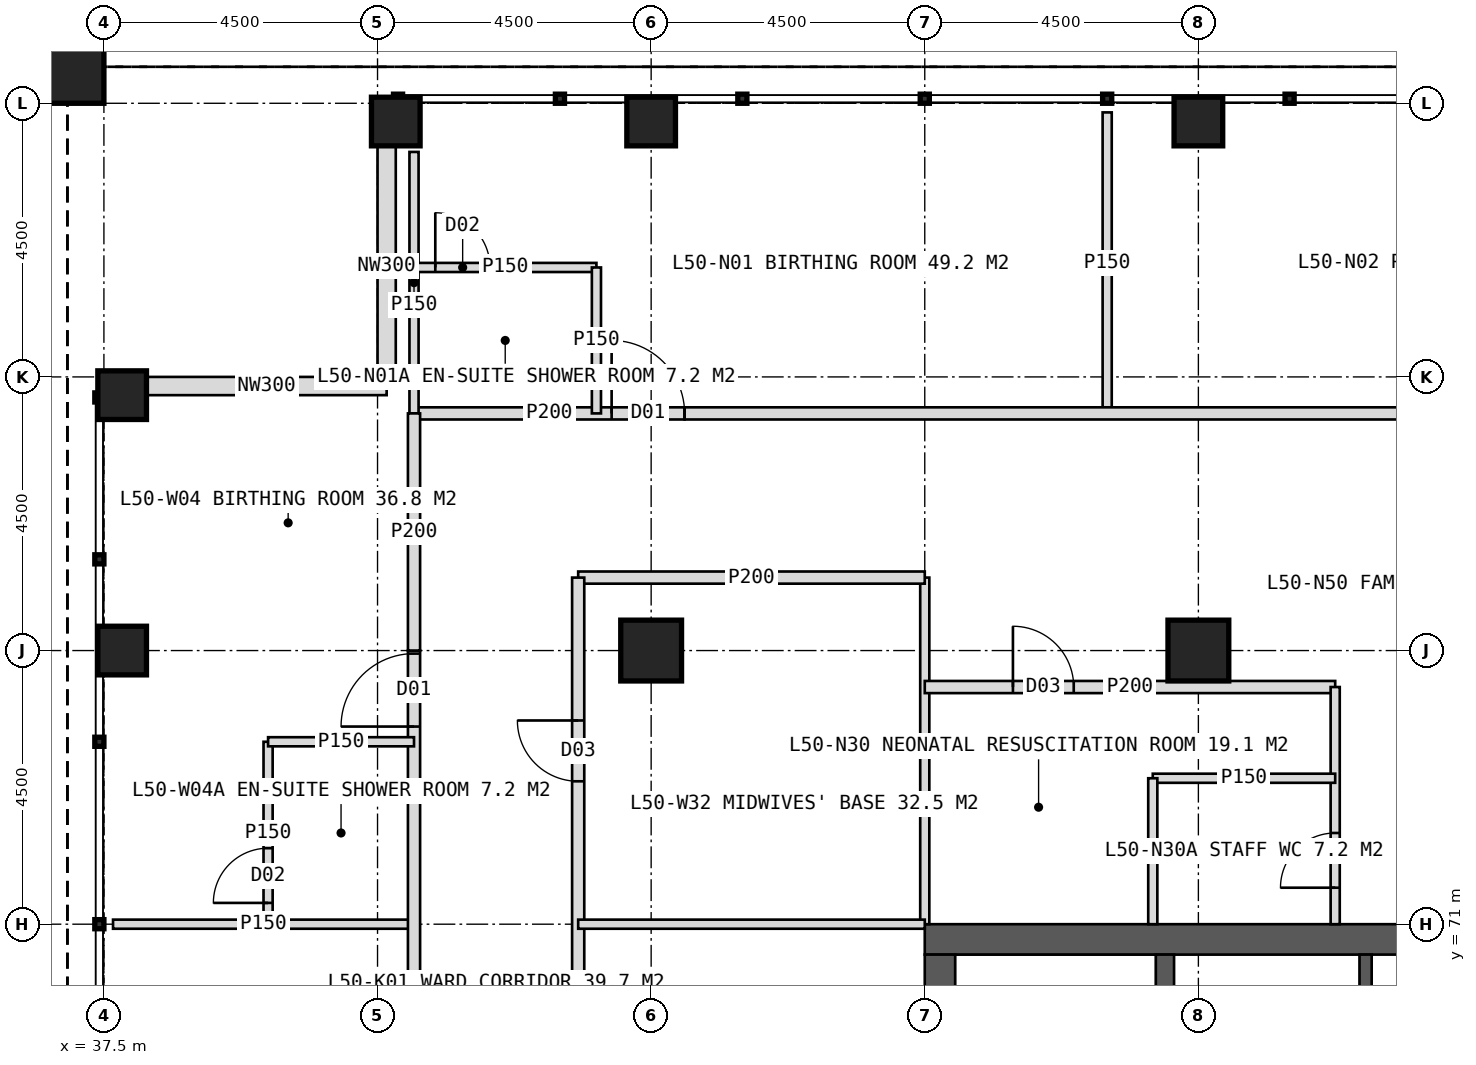
"""IFC4 building model, lengths in metres.
Left out: names, types, materials, properties, quantities, classifications, styles, units other than length and angle.
Written with IfcOpenShell. Run it as: python <this file> out.ifc"""

import sys

from ifc_helpers import new_model, si_unit, direction, frame, frame_2d, origin, origin_2d, place, context, subcontext, project, spatial, rectangle, hollow_rectangle, extrude, element, fill, save


model = new_model("IFC4")
c1 = context("Model", 3, precision=1e-05, world=origin(), true_north=direction((0.0, 1.0)))
c2 = subcontext(c1, "Body", "Model", "MODEL_VIEW")
j1 = project(units=[si_unit("LENGTHUNIT", "METRE"), si_unit("PLANEANGLEUNIT", "RADIAN")], contexts=[c1])
p1 = place(None, origin())
s1 = spatial("IfcSite", under=j1, at=p1, CompositionType="ELEMENT")
p2 = place(p1, origin())
s2 = spatial("IfcBuilding", under=s1, at=p2, CompositionType="ELEMENT")
p3 = place(p2, frame((0.0, 0.0, 209.0)))
s3 = spatial("IfcBuildingStorey", under=s2, at=p3, CompositionType="ELEMENT", Elevation=209.0)
p4 = place(p3, frame((51.0, 70.75, 0.0), z_axis=(0.0, 0.0, 1.0), x_axis=(1.0, 0.0, 0.0)))
e1 = element("IfcWall", 1, at=p4, inside=s3, PredefinedType="SHEAR", context=c2, shape_type="SweptSolid", body=[
    extrude(rectangle(XDim=18.0, YDim=0.5, at=frame_2d((9.0, 0.0))), origin(), (0.0, 0.0, 1.0), 4.0),
])
p5 = place(p4, frame((8.1, 0.0, 0.0)))
e2 = element("IfcOpeningElement", 2, at=p5, cuts=e1, PredefinedType="OPENING", context=c2, shape_type="SweptSolid", body=[
    extrude(rectangle(XDim=1.8, YDim=2.2, at=frame_2d((0.9, 1.1))), frame((0.0, 0.26, 0.0), z_axis=(0.0, -1.0, 0.0), x_axis=(1.0, 0.0, 0.0)), (0.0, 0.0, 1.0), 0.52),
])
p6 = place(p3, frame((51.25, 53.5, 0.0), z_axis=(0.0, 0.0, 1.0), x_axis=(0.0, 1.0, 0.0)))
e3 = element("IfcWall", 3, at=p6, inside=s3, PredefinedType="SHEAR", context=c2, shape_type="SweptSolid", body=[
    extrude(rectangle(XDim=17.0, YDim=0.5, at=frame_2d((8.5, 0.0))), origin(), (0.0, 0.0, 1.0), 4.0),
])
p7 = place(p6, frame((6.1, 0.0, 0.0)))
e4 = element("IfcOpeningElement", 4, at=p7, cuts=e3, PredefinedType="OPENING", context=c2, shape_type="SweptSolid", body=[
    extrude(rectangle(XDim=1.5, YDim=2.2, at=frame_2d((0.75, 1.1))), frame((0.0, 0.26, 0.0), z_axis=(0.0, -1.0, 0.0), x_axis=(1.0, 0.0, 0.0)), (0.0, 0.0, 1.0), 0.52),
])
p8 = place(p3, frame((54.95, 53.5, 0.0), z_axis=(0.0, 0.0, 1.0), x_axis=(0.0, 1.0, 0.0)))
e5 = element("IfcWall", 5, at=p8, inside=s3, PredefinedType="SHEAR", context=c2, shape_type="SweptSolid", body=[
    extrude(rectangle(XDim=17.0, YDim=0.3, at=frame_2d((8.5, 0.0))), origin(), (0.0, 0.0, 1.0), 4.0),
])
p9 = place(p3, frame((58.25, 53.5, 0.0), z_axis=(0.0, 0.0, 1.0), x_axis=(0.0, 1.0, 0.0)))
e6 = element("IfcWall", 6, at=p9, inside=s3, PredefinedType="SHEAR", context=c2, shape_type="SweptSolid", body=[
    extrude(rectangle(XDim=17.0, YDim=0.2, at=frame_2d((8.5, 0.0))), origin(), (0.0, 0.0, 1.0), 4.0),
])
p10 = place(p9, frame((0.6, 0.0, 0.0)))
e7 = element("IfcOpeningElement", 7, at=p10, cuts=e6, PredefinedType="OPENING", context=c2, shape_type="SweptSolid", body=[
    extrude(rectangle(XDim=1.0, YDim=2.1, at=frame_2d((0.5, 1.05))), frame((0.0, 0.11, 0.0), z_axis=(0.0, -1.0, 0.0), x_axis=(1.0, 0.0, 0.0)), (0.0, 0.0, 1.0), 0.22),
])
p11 = place(p9, frame((2.75, 0.0, 0.0)))
e8 = element("IfcOpeningElement", 8, at=p11, cuts=e6, PredefinedType="OPENING", context=c2, shape_type="SweptSolid", body=[
    extrude(rectangle(XDim=1.0, YDim=2.1, at=frame_2d((0.5, 1.05))), frame((0.0, 0.11, 0.0), z_axis=(0.0, -1.0, 0.0), x_axis=(1.0, 0.0, 0.0)), (0.0, 0.0, 1.0), 0.22),
])
p12 = place(p9, frame((4.824, 0.0, 0.0)))
e9 = element("IfcOpeningElement", 9, at=p12, cuts=e6, PredefinedType="OPENING", context=c2, shape_type="SweptSolid", body=[
    extrude(rectangle(XDim=1.0, YDim=2.1, at=frame_2d((0.5, 1.05))), frame((0.0, 0.11, 0.0), z_axis=(0.0, -1.0, 0.0), x_axis=(1.0, 0.0, 0.0)), (0.0, 0.0, 1.0), 0.22),
])
p13 = place(p9, frame((6.924, 0.0, 0.0)))
e10 = element("IfcOpeningElement", 10, at=p13, cuts=e6, PredefinedType="OPENING", context=c2, shape_type="SweptSolid", body=[
    extrude(rectangle(XDim=1.0, YDim=2.1, at=frame_2d((0.5, 1.05))), frame((0.0, 0.11, 0.0), z_axis=(0.0, -1.0, 0.0), x_axis=(1.0, 0.0, 0.0)), (0.0, 0.0, 1.0), 0.22),
])
p14 = place(p9, frame((10.025, 0.0, 0.0)))
e11 = element("IfcOpeningElement", 11, at=p14, cuts=e6, PredefinedType="OPENING", context=c2, shape_type="SweptSolid", body=[
    extrude(rectangle(XDim=1.4, YDim=2.2, at=frame_2d((0.7, 1.1))), frame((0.0, 0.11, 0.0), z_axis=(0.0, -1.0, 0.0), x_axis=(1.0, 0.0, 0.0)), (0.0, 0.0, 1.0), 0.22),
])
p15 = place(p9, frame((14.325, 0.0, 0.0)))
e12 = element("IfcOpeningElement", 12, at=p15, cuts=e6, PredefinedType="OPENING", context=c2, shape_type="SweptSolid", body=[
    extrude(rectangle(XDim=1.4, YDim=2.2, at=frame_2d((0.7, 1.1))), frame((0.0, 0.11, 0.0), z_axis=(0.0, -1.0, 0.0), x_axis=(1.0, 0.0, 0.0)), (0.0, 0.0, 1.0), 0.22),
])
for number, where, z_axis, x_axis in (
    (13, (46.5, 75.5, 0.0), (0.0, 0.0, 1.0), (1.0, 0.0, 0.0)),
    (14, (55.5, 75.5, 0.0), (0.0, 0.0, 1.0), (1.0, 0.0, 0.0)),
):
    element("IfcColumn", number, at=place(p3, frame(where, z_axis=z_axis, x_axis=x_axis)), inside=s3, PredefinedType="COLUMN", context=c2, shape_type="SweptSolid", body=[
        extrude(hollow_rectangle(XDim=1.0, YDim=1.0, WallThickness=0.1, at=origin_2d()), origin(), (0.0, 0.0, 1.0), 4.0),
    ])
for number, where, z_axis, x_axis in (
    (15, (42.3, 84.2, 0.0), (0.0, 0.0, 1.0), (1.0, 0.0, 0.0)),
    (16, (46.5, 84.2, 0.0), (0.0, 0.0, 1.0), (1.0, 0.0, 0.0)),
    (17, (55.5, 84.2, 0.0), (0.0, 0.0, 1.0), (1.0, 0.0, 0.0)),
    (18, (37.8, 75.5, 0.0), (0.0, 0.0, 1.0), (1.0, 0.0, 0.0)),
    (19, (37.8, 79.7, 0.0), (0.0, 0.0, 1.0), (1.0, 0.0, 0.0)),
):
    element("IfcColumn", number, at=place(p3, frame(where, z_axis=z_axis, x_axis=x_axis)), inside=s3, PredefinedType="COLUMN", context=c2, shape_type="SweptSolid", body=[
        extrude(hollow_rectangle(XDim=0.8, YDim=0.8, WallThickness=0.08, at=origin_2d()), origin(), (0.0, 0.0, 1.0), 4.0),
    ])
p16 = place(p3, frame((36.9, 85.1, 0.0), z_axis=(0.0, 0.0, 1.0), x_axis=(1.0, 0.0, 0.0)))
e20 = element("IfcColumn", 20, at=p16, inside=s3, PredefinedType="COLUMN", context=c2, shape_type="SweptSolid", body=[
    extrude(hollow_rectangle(XDim=1.2, YDim=1.2, WallThickness=0.07, at=origin_2d()), origin(), (0.0, 0.0, 1.0), 4.0),
])
for number, where, z_axis, x_axis in (
    (21, (38.2, 79.85, 0.0), (0.0, 0.0, 1.0), (1.0, 0.0, 0.0)),
    (22, (42.15, 79.85, 0.0), (0.0, 0.0, 1.0), (0.0, 1.0, 0.0)),
):
    element("IfcWall", number, at=place(p3, frame(where, z_axis=z_axis, x_axis=x_axis)), inside=s3, PredefinedType="ELEMENTEDWALL", context=c2, shape_type="SweptSolid", body=[
        extrude(rectangle(XDim=3.95, YDim=0.3, at=frame_2d((1.975, 0.0))), origin(), (0.0, 0.0, 1.0), 2.85),
    ])
p17 = place(p3, frame((54.0, 79.4, 0.0), z_axis=(0.0, 0.0, 1.0), x_axis=(0.0, 1.0, 0.0)))
e23 = element("IfcWall", 23, at=p17, inside=s3, PredefinedType="PARTITIONING", context=c2, shape_type="SweptSolid", body=[
    extrude(rectangle(XDim=4.95, YDim=0.15, at=frame_2d((2.475, 0.0))), origin(), (0.0, 0.0, 1.0), 3.75),
])
p18 = place(p3, frame((42.6, 79.4, 0.0), z_axis=(0.0, 0.0, 1.0), x_axis=(1.0, 0.0, 0.0)))
e24 = element("IfcWall", 24, at=p18, inside=s3, PredefinedType="PARTITIONING", context=c2, shape_type="SweptSolid", body=[
    extrude(rectangle(XDim=4.45, YDim=0.2, at=frame_2d((2.225, 0.0))), origin(), (0.0, 0.0, 1.0), 2.85),
])
p19 = place(p18, frame((3.25, 0.0, 0.0)))
e25 = element("IfcOpeningElement", 25, at=p19, cuts=e24, PredefinedType="OPENING", context=c2, shape_type="SweptSolid", body=[
    extrude(rectangle(XDim=1.2, YDim=2.2, at=frame_2d((0.6, 1.1))), frame((0.0, 0.11, 0.0), z_axis=(0.0, -1.0, 0.0), x_axis=(1.0, 0.0, 0.0)), (0.0, 0.0, 1.0), 0.22),
])
p20 = place(p3, frame((47.05, 79.4, 0.0), z_axis=(0.0, 0.0, 1.0), x_axis=(1.0, 0.0, 0.0)))
e26 = element("IfcWall", 26, at=p20, inside=s3, PredefinedType="PARTITIONING", context=c2, shape_type="SweptSolid", body=[
    extrude(rectangle(XDim=26.45, YDim=0.2, at=frame_2d((13.225, 0.0))), origin(), (0.0, 0.0, 1.0), 3.75),
])
p21 = place(p20, frame((12.45, 0.0, 0.0)))
e27 = element("IfcOpeningElement", 27, at=p21, cuts=e26, PredefinedType="OPENING", context=c2, shape_type="SweptSolid", body=[
    extrude(rectangle(XDim=1.0, YDim=2.1, at=frame_2d((0.5, 1.05))), frame((0.0, 0.11, 0.0), z_axis=(0.0, -1.0, 0.0), x_axis=(1.0, 0.0, 0.0)), (0.0, 0.0, 1.0), 0.22),
])
p22 = place(p20, frame((22.2, 0.0, 0.0)))
e28 = element("IfcOpeningElement", 28, at=p22, cuts=e26, PredefinedType="OPENING", context=c2, shape_type="SweptSolid", body=[
    extrude(rectangle(XDim=1.2, YDim=2.2, at=frame_2d((0.6, 1.1))), frame((0.0, 0.11, 0.0), z_axis=(0.0, -1.0, 0.0), x_axis=(1.0, 0.0, 0.0)), (0.0, 0.0, 1.0), 0.22),
])
p23 = place(p3, frame((42.6, 79.4, 0.0), z_axis=(0.0, 0.0, 1.0), x_axis=(0.0, 1.0, 0.0)))
e29 = element("IfcWall", 29, at=p23, inside=s3, PredefinedType="PARTITIONING", context=c2, shape_type="SweptSolid", body=[
    extrude(rectangle(XDim=4.3, YDim=0.15, at=frame_2d((2.15, 0.0))), origin(), (0.0, 0.0, 1.0), 2.85),
])
p24 = place(p3, frame((42.6, 81.8, 0.0), z_axis=(0.0, 0.0, 1.0), x_axis=(1.0, 0.0, 0.0)))
e30 = element("IfcWall", 30, at=p24, inside=s3, PredefinedType="PARTITIONING", context=c2, shape_type="SweptSolid", body=[
    extrude(rectangle(XDim=3.0, YDim=0.15, at=frame_2d((1.5, 0.0))), origin(), (0.0, 0.0, 1.0), 3.75),
])
p25 = place(p24, frame((0.35, 0.0, 0.0)))
e31 = element("IfcOpeningElement", 31, at=p25, cuts=e30, PredefinedType="OPENING", context=c2, shape_type="SweptSolid", body=[
    extrude(rectangle(XDim=0.9, YDim=2.1, at=frame_2d((0.45, 1.05))), frame((0.0, 0.085, 0.0), z_axis=(0.0, -1.0, 0.0), x_axis=(1.0, 0.0, 0.0)), (0.0, 0.0, 1.0), 0.17),
])
p26 = place(p3, frame((45.6, 79.4, 0.0), z_axis=(0.0, 0.0, 1.0), x_axis=(0.0, 1.0, 0.0)))
e32 = element("IfcWall", 32, at=p26, inside=s3, PredefinedType="PARTITIONING", context=c2, shape_type="SweptSolid", body=[
    extrude(rectangle(XDim=2.4, YDim=0.15, at=frame_2d((1.2, 0.0))), origin(), (0.0, 0.0, 1.0), 3.75),
])
p27 = place(p3, frame((51.0, 71.0, 0.0), z_axis=(0.0, 0.0, 1.0), x_axis=(0.0, 1.0, 0.0)))
e33 = element("IfcWall", 33, at=p27, inside=s3, PredefinedType="PARTITIONING", context=c2, shape_type="SweptSolid", body=[
    extrude(rectangle(XDim=5.7, YDim=0.15, at=frame_2d((2.85, 0.0))), origin(), (0.0, 0.0, 1.0), 3.75),
])
p28 = place(p3, frame((45.3, 76.7, 0.0), z_axis=(0.0, 0.0, 1.0), x_axis=(1.0, 0.0, 0.0)))
e34 = element("IfcWall", 34, at=p28, inside=s3, PredefinedType="PARTITIONING", context=c2, shape_type="SweptSolid", body=[
    extrude(rectangle(XDim=5.7, YDim=0.2, at=frame_2d((2.85, 0.0))), origin(), (0.0, 0.0, 1.0), 3.75),
])
p29 = place(p3, frame((51.0, 74.9, 0.0), z_axis=(0.0, 0.0, 1.0), x_axis=(1.0, 0.0, 0.0)))
e35 = element("IfcWall", 35, at=p29, inside=s3, PredefinedType="PARTITIONING", context=c2, shape_type="SweptSolid", body=[
    extrude(rectangle(XDim=6.75, YDim=0.2, at=frame_2d((3.375, 0.0))), origin(), (0.0, 0.0, 1.0), 3.75),
])
p30 = place(p29, frame((1.45, 0.0, 0.0)))
e36 = element("IfcOpeningElement", 36, at=p30, cuts=e35, PredefinedType="OPENING", context=c2, shape_type="SweptSolid", body=[
    extrude(rectangle(XDim=1.0, YDim=2.1, at=frame_2d((0.5, 1.05))), frame((0.0, 0.11, 0.0), z_axis=(0.0, -1.0, 0.0), x_axis=(1.0, 0.0, 0.0)), (0.0, 0.0, 1.0), 0.22),
])
p31 = place(p3, frame((57.75, 71.0, 0.0), z_axis=(0.0, 0.0, 1.0), x_axis=(0.0, 1.0, 0.0)))
e37 = element("IfcWall", 37, at=p31, inside=s3, PredefinedType="PARTITIONING", context=c2, shape_type="SweptSolid", body=[
    extrude(rectangle(XDim=3.9, YDim=0.15, at=frame_2d((1.95, 0.0))), origin(), (0.0, 0.0, 1.0), 3.75),
])
p32 = place(p31, frame((0.6, 0.0, 0.0)))
e38 = element("IfcOpeningElement", 38, at=p32, cuts=e37, PredefinedType="OPENING", context=c2, shape_type="SweptSolid", body=[
    extrude(rectangle(XDim=0.9, YDim=2.1, at=frame_2d((0.45, 1.05))), frame((0.0, 0.085, 0.0), z_axis=(0.0, -1.0, 0.0), x_axis=(1.0, 0.0, 0.0)), (0.0, 0.0, 1.0), 0.17),
])
p33 = place(p3, frame((54.75, 73.4, 0.0), z_axis=(0.0, 0.0, 1.0), x_axis=(1.0, 0.0, 0.0)))
e39 = element("IfcWall", 39, at=p33, inside=s3, PredefinedType="PARTITIONING", context=c2, shape_type="SweptSolid", body=[
    extrude(rectangle(XDim=3.0, YDim=0.15, at=frame_2d((1.5, 0.0))), origin(), (0.0, 0.0, 1.0), 3.75),
])
p34 = place(p3, frame((54.75, 71.0, 0.0), z_axis=(0.0, 0.0, 1.0), x_axis=(0.0, 1.0, 0.0)))
e40 = element("IfcWall", 40, at=p34, inside=s3, PredefinedType="PARTITIONING", context=c2, shape_type="SweptSolid", body=[
    extrude(rectangle(XDim=2.4, YDim=0.15, at=frame_2d((1.2, 0.0))), origin(), (0.0, 0.0, 1.0), 3.75),
])
p35 = place(p3, frame((42.6, 71.0, 0.0), z_axis=(0.0, 0.0, 1.0), x_axis=(-1.0, 0.0, 0.0)))
e41 = element("IfcWall", 41, at=p35, inside=s3, PredefinedType="PARTITIONING", context=c2, shape_type="SweptSolid", body=[
    extrude(rectangle(XDim=4.95, YDim=0.15, at=frame_2d((2.475, 0.0))), origin(), (0.0, 0.0, 1.0), 3.75),
])
p36 = place(p3, frame((42.6, 49.05, 0.0), z_axis=(0.0, 0.0, 1.0), x_axis=(0.0, 1.0, 0.0)))
e42 = element("IfcWall", 42, at=p36, inside=s3, PredefinedType="PARTITIONING", context=c2, shape_type="SweptSolid", body=[
    extrude(rectangle(XDim=26.45, YDim=0.2, at=frame_2d((13.225, 0.0))), origin(), (0.0, 0.0, 1.0), 3.75),
])
p37 = place(p36, frame((7.2, 0.0, 0.0)))
e43 = element("IfcOpeningElement", 43, at=p37, cuts=e42, PredefinedType="OPENING", context=c2, shape_type="SweptSolid", body=[
    extrude(rectangle(XDim=1.2, YDim=2.2, at=frame_2d((0.6, 1.1))), frame((0.0, 0.11, 0.0), z_axis=(0.0, -1.0, 0.0), x_axis=(1.0, 0.0, 0.0)), (0.0, 0.0, 1.0), 0.22),
])
p38 = place(p36, frame((16.2, 0.0, 0.0)))
e44 = element("IfcOpeningElement", 44, at=p38, cuts=e42, PredefinedType="OPENING", context=c2, shape_type="SweptSolid", body=[
    extrude(rectangle(XDim=1.2, YDim=2.2, at=frame_2d((0.6, 1.1))), frame((0.0, 0.11, 0.0), z_axis=(0.0, -1.0, 0.0), x_axis=(1.0, 0.0, 0.0)), (0.0, 0.0, 1.0), 0.22),
])
p39 = place(p36, frame((25.2, 0.0, 0.0)))
e45 = element("IfcOpeningElement", 45, at=p39, cuts=e42, PredefinedType="OPENING", context=c2, shape_type="SweptSolid", body=[
    extrude(rectangle(XDim=1.2, YDim=2.2, at=frame_2d((0.6, 1.1))), frame((0.0, 0.11, 0.0), z_axis=(0.0, -1.0, 0.0), x_axis=(1.0, 0.0, 0.0)), (0.0, 0.0, 1.0), 0.22),
])
p40 = place(p3, frame((42.6, 75.5, 0.0), z_axis=(0.0, 0.0, 1.0), x_axis=(0.0, 1.0, 0.0)))
e46 = element("IfcWall", 46, at=p40, inside=s3, PredefinedType="PARTITIONING", context=c2, shape_type="SweptSolid", body=[
    extrude(rectangle(XDim=3.9, YDim=0.2, at=frame_2d((1.95, 0.0))), origin(), (0.0, 0.0, 1.0), 2.85),
])
p41 = place(p3, frame((40.2, 71.0, 0.0), z_axis=(0.0, 0.0, 1.0), x_axis=(0.0, 1.0, 0.0)))
e47 = element("IfcWall", 47, at=p41, inside=s3, PredefinedType="PARTITIONING", context=c2, shape_type="SweptSolid", body=[
    extrude(rectangle(XDim=3.0, YDim=0.15, at=frame_2d((1.5, 0.0))), origin(), (0.0, 0.0, 1.0), 3.75),
])
p42 = place(p41, frame((0.35, 0.0, 0.0)))
e48 = element("IfcOpeningElement", 48, at=p42, cuts=e47, PredefinedType="OPENING", context=c2, shape_type="SweptSolid", body=[
    extrude(rectangle(XDim=0.9, YDim=2.1, at=frame_2d((0.45, 1.05))), frame((0.0, 0.085, 0.0), z_axis=(0.0, -1.0, 0.0), x_axis=(1.0, 0.0, 0.0)), (0.0, 0.0, 1.0), 0.17),
])
p43 = place(p3, frame((42.6, 74.0, 0.0), z_axis=(0.0, 0.0, 1.0), x_axis=(-1.0, 0.0, 0.0)))
e49 = element("IfcWall", 49, at=p43, inside=s3, PredefinedType="PARTITIONING", context=c2, shape_type="SweptSolid", body=[
    extrude(rectangle(XDim=2.4, YDim=0.15, at=frame_2d((1.2, 0.0))), origin(), (0.0, 0.0, 1.0), 3.75),
])
p44 = place(p3, frame((45.3, 62.0, 0.0), z_axis=(0.0, 0.0, 1.0), x_axis=(0.0, 1.0, 0.0)))
e50 = element("IfcWall", 50, at=p44, inside=s3, PredefinedType="PARTITIONING", context=c2, shape_type="SweptSolid", body=[
    extrude(rectangle(XDim=14.7, YDim=0.2, at=frame_2d((7.35, 0.0))), origin(), (0.0, 0.0, 1.0), 3.75),
])
p45 = place(p44, frame((1.45, 0.0, 0.0)))
e51 = element("IfcOpeningElement", 51, at=p45, cuts=e50, PredefinedType="OPENING", context=c2, shape_type="SweptSolid", body=[
    extrude(rectangle(XDim=1.0, YDim=2.1, at=frame_2d((0.5, 1.05))), frame((0.0, 0.11, 0.0), z_axis=(0.0, -1.0, 0.0), x_axis=(1.0, 0.0, 0.0)), (0.0, 0.0, 1.0), 0.22),
])
p46 = place(p44, frame((11.35, 0.0, 0.0)))
e52 = element("IfcOpeningElement", 52, at=p46, cuts=e50, PredefinedType="OPENING", context=c2, shape_type="SweptSolid", body=[
    extrude(rectangle(XDim=1.0, YDim=2.1, at=frame_2d((0.5, 1.05))), frame((0.0, 0.11, 0.0), z_axis=(0.0, -1.0, 0.0), x_axis=(1.0, 0.0, 0.0)), (0.0, 0.0, 1.0), 0.22),
])
p47 = place(p3, frame((51.0, 71.0, 0.0), z_axis=(0.0, 0.0, 1.0), x_axis=(-1.0, 0.0, 0.0)))
e53 = element("IfcWall", 53, at=p47, inside=s3, PredefinedType="PARTITIONING", context=c2, shape_type="SweptSolid", body=[
    extrude(rectangle(XDim=5.7, YDim=0.15, at=frame_2d((2.85, 0.0))), origin(), (0.0, 0.0, 1.0), 3.75),
])
p48 = place(p19, origin())
e54 = element("IfcDoor", 54, at=p48, inside=s3, OperationType="SINGLE_SWING_LEFT", PredefinedType="DOOR", context=c2, shape_type="SweptSolid", body=[
    extrude(rectangle(XDim=1.2, YDim=2.2, at=frame_2d((0.6, 1.1))), frame((0.0, 0.025, 0.0), z_axis=(0.0, -1.0, 0.0), x_axis=(1.0, 0.0, 0.0)), (0.0, 0.0, 1.0), 0.05),
])
fill(e25, e54)
p49 = place(p25, origin())
e55 = element("IfcDoor", 55, at=p49, inside=s3, OperationType="SINGLE_SWING_LEFT", PredefinedType="DOOR", context=c2, shape_type="SweptSolid", body=[
    extrude(rectangle(XDim=0.9, YDim=2.1, at=frame_2d((0.45, 1.05))), frame((0.0, 0.025, 0.0), z_axis=(0.0, -1.0, 0.0), x_axis=(1.0, 0.0, 0.0)), (0.0, 0.0, 1.0), 0.05),
])
fill(e31, e55)
p50 = place(p32, origin())
e56 = element("IfcDoor", 56, at=p50, inside=s3, OperationType="SINGLE_SWING_LEFT", PredefinedType="DOOR", context=c2, shape_type="SweptSolid", body=[
    extrude(rectangle(XDim=0.9, YDim=2.1, at=frame_2d((0.45, 1.05))), frame((0.0, 0.025, 0.0), z_axis=(0.0, -1.0, 0.0), x_axis=(1.0, 0.0, 0.0)), (0.0, 0.0, 1.0), 0.05),
])
fill(e38, e56)
p51 = place(p30, origin())
e57 = element("IfcDoor", 57, at=p51, inside=s3, OperationType="SINGLE_SWING_LEFT", PredefinedType="DOOR", context=c2, shape_type="SweptSolid", body=[
    extrude(rectangle(XDim=1.0, YDim=2.1, at=frame_2d((0.5, 1.05))), frame((0.0, 0.025, 0.0), z_axis=(0.0, -1.0, 0.0), x_axis=(1.0, 0.0, 0.0)), (0.0, 0.0, 1.0), 0.05),
])
fill(e36, e57)
p52 = place(p39, origin())
e58 = element("IfcDoor", 58, at=p52, inside=s3, OperationType="SINGLE_SWING_LEFT", PredefinedType="DOOR", context=c2, shape_type="SweptSolid", body=[
    extrude(rectangle(XDim=1.2, YDim=2.2, at=frame_2d((0.6, 1.1))), frame((0.0, 0.025, 0.0), z_axis=(0.0, -1.0, 0.0), x_axis=(1.0, 0.0, 0.0)), (0.0, 0.0, 1.0), 0.05),
])
fill(e45, e58)
p53 = place(p42, origin())
e59 = element("IfcDoor", 59, at=p53, inside=s3, OperationType="SINGLE_SWING_LEFT", PredefinedType="DOOR", context=c2, shape_type="SweptSolid", body=[
    extrude(rectangle(XDim=0.9, YDim=2.1, at=frame_2d((0.45, 1.05))), frame((0.0, 0.025, 0.0), z_axis=(0.0, -1.0, 0.0), x_axis=(1.0, 0.0, 0.0)), (0.0, 0.0, 1.0), 0.05),
])
fill(e48, e59)
p54 = place(p46, origin())
e60 = element("IfcDoor", 60, at=p54, inside=s3, OperationType="SINGLE_SWING_RIGHT", PredefinedType="DOOR", context=c2, shape_type="SweptSolid", body=[
    extrude(rectangle(XDim=1.0, YDim=2.1, at=frame_2d((0.5, 1.05))), frame((0.0, 0.025, 0.0), z_axis=(0.0, -1.0, 0.0), x_axis=(1.0, 0.0, 0.0)), (0.0, 0.0, 1.0), 0.05),
])
fill(e52, e60)
save(model, sys.argv[1])
